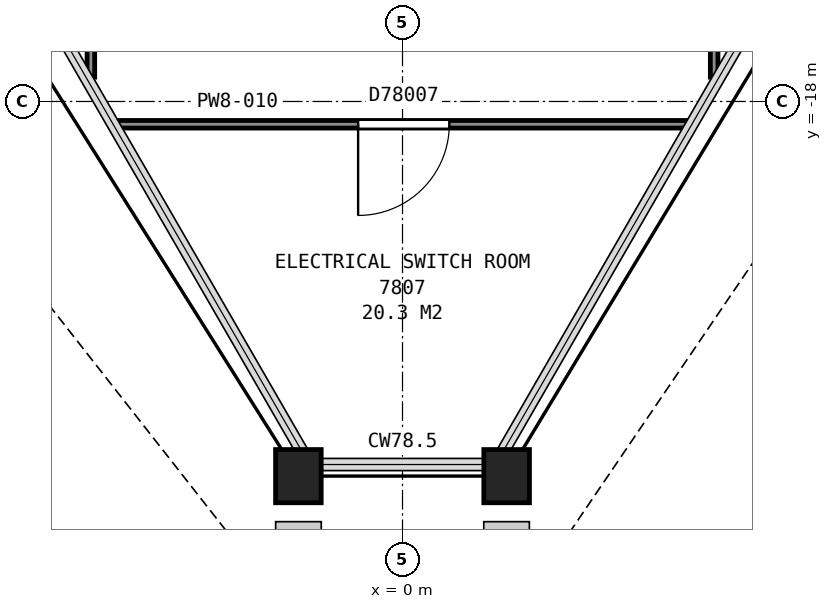
"""IFC4 building model, lengths in metres.
Left out: names, types, materials, properties, quantities, classifications, styles, units other than length and angle.
Written with IfcOpenShell. Run it as: python <this file> out.ifc"""

import sys

from ifc_helpers import new_model, si_unit, direction, frame, frame_2d, origin, origin_2d, place, context, subcontext, project, spatial, rectangle, hollow_rectangle, extrude, element, fill, save


model = new_model("IFC4")
c1 = context("Model", 3, precision=1e-05, world=origin(), true_north=direction((0.0, 1.0)))
c2 = subcontext(c1, "Body", "Model", "MODEL_VIEW")
j1 = project(units=[si_unit("LENGTHUNIT", "METRE"), si_unit("PLANEANGLEUNIT", "RADIAN")], contexts=[c1])
p1 = place(None, origin())
s1 = spatial("IfcSite", under=j1, at=p1, CompositionType="ELEMENT")
p2 = place(p1, origin())
s2 = spatial("IfcBuilding", under=s1, at=p2, CompositionType="ELEMENT")
p3 = place(p2, frame((0.0, 0.0, 308.4)))
s3 = spatial("IfcBuildingStorey", under=s2, at=p3, CompositionType="ELEMENT", Elevation=308.4)
for number, where, z_axis, x_axis in (
    (1, (-1.37, -22.93, 0.09), (0.0, 0.0, 1.0), (-1.0, 0.0, 0.0)),
    (2, (1.37, -22.93, 0.09), (0.0, 0.0, 1.0), (-1.0, 0.0, 0.0)),
):
    element("IfcColumn", number, at=place(p3, frame(where, z_axis=z_axis, x_axis=x_axis)), inside=s3, PredefinedType="COLUMN", context=c2, shape_type="SweptSolid", body=[
        extrude(hollow_rectangle(XDim=0.6, YDim=0.7, WallThickness=0.04, at=origin_2d()), origin(), (0.0, 0.0, 1.0), 4.11),
    ])
p4 = place(p3, frame((-4.1, -17.68, 0.0), z_axis=(0.0, 0.0, 1.0), x_axis=(0.0, 1.0, 0.0)))
e3 = element("IfcWall", 3, at=p4, inside=s3, PredefinedType="PARTITIONING", context=c2, shape_type="SweptSolid", body=[
    extrude(rectangle(XDim=7.508, YDim=0.1, at=frame_2d((3.754, 0.0))), origin(), (0.0, 0.0, 1.0), 3.297),
])
p5 = place(p4, frame((3.137, 0.0, 0.0)))
e4 = element("IfcOpeningElement", 4, at=p5, cuts=e3, PredefinedType="OPENING", context=c2, shape_type="SweptSolid", body=[
    extrude(rectangle(XDim=1.5, YDim=2.1, at=frame_2d((0.75, 1.05))), frame((0.0, 0.06, 0.0), z_axis=(0.0, -1.0, 0.0), x_axis=(1.0, 0.0, 0.0)), (0.0, 0.0, 1.0), 0.12),
])
p6 = place(p3, frame((3.763, -18.3, 0.0), z_axis=(0.0, 0.0, 1.0), x_axis=(-1.0, 0.0, 0.0)))
e5 = element("IfcWall", 5, at=p6, inside=s3, PredefinedType="PARTITIONING", context=c2, shape_type="SweptSolid", body=[
    extrude(rectangle(XDim=7.526, YDim=0.1, at=frame_2d((3.763, 0.0))), origin(), (0.0, 0.0, 1.0), 3.297),
])
p7 = place(p6, frame((3.147, 0.0, 0.0)))
e6 = element("IfcOpeningElement", 6, at=p7, cuts=e5, PredefinedType="OPENING", context=c2, shape_type="SweptSolid", body=[
    extrude(rectangle(XDim=1.2, YDim=2.1, at=frame_2d((0.6, 1.05))), frame((0.0, 0.06, 0.0), z_axis=(0.0, -1.0, 0.0), x_axis=(1.0, 0.0, 0.0)), (0.0, 0.0, 1.0), 0.12),
])
p8 = place(p3, frame((4.1, -10.172, 0.0), z_axis=(0.0, 0.0, 1.0), x_axis=(0.0, -1.0, 0.0)))
e7 = element("IfcWall", 7, at=p8, inside=s3, PredefinedType="PARTITIONING", context=c2, shape_type="SweptSolid", body=[
    extrude(rectangle(XDim=7.508, YDim=0.1, at=frame_2d((3.754, 0.0))), origin(), (0.0, 0.0, 1.0), 3.297),
])
p9 = place(p8, frame((2.871, 0.0, 0.0)))
e8 = element("IfcOpeningElement", 8, at=p9, cuts=e7, PredefinedType="OPENING", context=c2, shape_type="SweptSolid", body=[
    extrude(rectangle(XDim=1.5, YDim=2.1, at=frame_2d((0.75, 1.05))), frame((0.0, 0.06, 0.0), z_axis=(0.0, -1.0, 0.0), x_axis=(1.0, 0.0, 0.0)), (0.0, 0.0, 1.0), 0.12),
])
p10 = place(p7, origin())
e9 = element("IfcDoor", 9, at=p10, inside=s3, OperationType="SINGLE_SWING_RIGHT", PredefinedType="DOOR", context=c2, shape_type="SweptSolid", body=[
    extrude(rectangle(XDim=1.2, YDim=2.1, at=frame_2d((0.6, 1.05))), frame((0.0, 0.025, 0.0), z_axis=(0.0, -1.0, 0.0), x_axis=(1.0, 0.0, 0.0)), (0.0, 0.0, 1.0), 0.05),
])
fill(e6, e9)
save(model, sys.argv[1])
